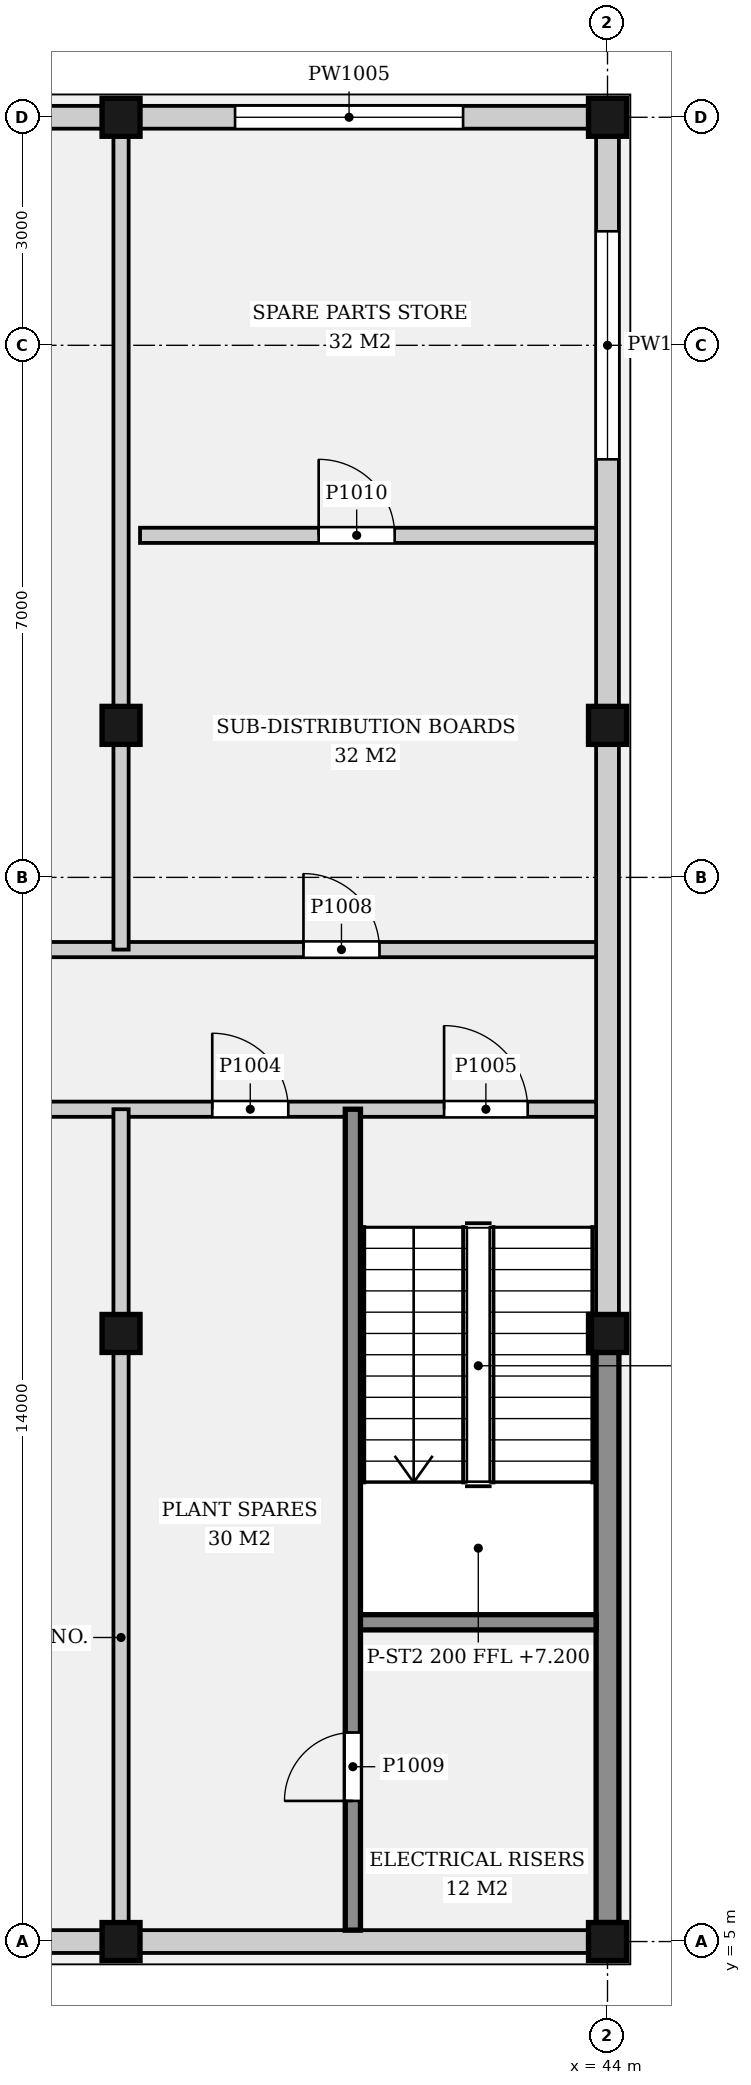
"""IFC4 building model, lengths in metres.
Left out: names, types, materials, properties, quantities, classifications, styles, units other than length and angle.
Written with IfcOpenShell. Run it as: python <this file> out.ifc"""

import sys

from ifc_helpers import new_model, si_unit, direction, frame, frame_2d, origin, origin_2d, place, context, subcontext, project, spatial, rectangle, extrude, element, fill, save


model = new_model("IFC4")
c1 = context("Model", 3, precision=1e-05, world=origin(), true_north=direction((0.0, 1.0)))
c2 = subcontext(c1, "Body", "Model", "MODEL_VIEW")
j1 = project(units=[si_unit("LENGTHUNIT", "METRE"), si_unit("PLANEANGLEUNIT", "RADIAN")], contexts=[c1])
p1 = place(None, origin())
s1 = spatial("IfcSite", under=j1, at=p1, CompositionType="ELEMENT")
p2 = place(p1, origin())
s2 = spatial("IfcBuilding", under=s1, at=p2, CompositionType="ELEMENT")
p3 = place(p2, frame((0.0, 0.0, 5.0)))
s3 = spatial("IfcBuildingStorey", under=s2, at=p3, CompositionType="ELEMENT", Elevation=5.0)
for number, where, z_axis, x_axis in (
    (1, (37.6, 5.0, 0.0), (0.0, 0.0, 1.0), (1.0, 0.0, 0.0)),
    (2, (37.6, 13.0, 0.0), (0.0, 0.0, 1.0), (1.0, 0.0, 0.0)),
    (3, (37.6, 21.0, 0.0), (0.0, 0.0, 1.0), (1.0, 0.0, 0.0)),
    (4, (37.6, 29.0, 0.0), (0.0, 0.0, 1.0), (1.0, 0.0, 0.0)),
    (5, (44.0, 5.0, 0.0), (0.0, 0.0, 1.0), (1.0, 0.0, 0.0)),
    (6, (44.0, 13.0, 0.0), (0.0, 0.0, 1.0), (1.0, 0.0, 0.0)),
    (7, (44.0, 21.0, 0.0), (0.0, 0.0, 1.0), (1.0, 0.0, 0.0)),
    (8, (44.0, 29.0, 0.0), (0.0, 0.0, 1.0), (1.0, 0.0, 0.0)),
):
    element("IfcColumn", number, at=place(p3, frame(where, z_axis=z_axis, x_axis=x_axis)), inside=s3, PredefinedType="COLUMN", context=c2, shape_type="SweptSolid", body=[
        extrude(rectangle(XDim=0.5, YDim=0.5, at=origin_2d()), origin(), (0.0, 0.0, 1.0), 4.4),
    ])
p4 = place(p3, frame((31.45, 5.0, 0.0), z_axis=(0.0, 0.0, 1.0), x_axis=(1.0, 0.0, 0.0)))
e9 = element("IfcWall", 9, at=p4, inside=s3, PredefinedType="SOLIDWALL", context=c2, shape_type="SweptSolid", body=[
    extrude(rectangle(XDim=5.9, YDim=0.3, at=frame_2d((2.95, 0.0))), origin(), (0.0, 0.0, 1.0), 3.98),
])
p5 = place(p4, frame((1.25, 0.0, 0.6)))
e10 = element("IfcOpeningElement", 10, at=p5, cuts=e9, PredefinedType="OPENING", context=c2, shape_type="SweptSolid", body=[
    extrude(rectangle(XDim=3.4, YDim=2.4, at=frame_2d((1.7, 1.2))), frame((0.0, 0.16, 0.0), z_axis=(0.0, -1.0, 0.0), x_axis=(1.0, 0.0, 0.0)), (0.0, 0.0, 1.0), 0.32),
])
p6 = place(p3, frame((37.85, 5.0, 0.0), z_axis=(0.0, 0.0, 1.0), x_axis=(1.0, 0.0, 0.0)))
e11 = element("IfcWall", 11, at=p6, inside=s3, PredefinedType="SOLIDWALL", context=c2, shape_type="SweptSolid", body=[
    extrude(rectangle(XDim=5.9, YDim=0.3, at=frame_2d((2.95, 0.0))), origin(), (0.0, 0.0, 1.0), 3.98),
])
p7 = place(p3, frame((31.45, 29.0, 0.0), z_axis=(0.0, 0.0, 1.0), x_axis=(1.0, 0.0, 0.0)))
e12 = element("IfcWall", 12, at=p7, inside=s3, PredefinedType="SOLIDWALL", context=c2, shape_type="SweptSolid", body=[
    extrude(rectangle(XDim=5.9, YDim=0.3, at=frame_2d((2.95, 0.0))), origin(), (0.0, 0.0, 1.0), 3.98),
])
p8 = place(p7, frame((1.25, 0.0, 0.6)))
e13 = element("IfcOpeningElement", 13, at=p8, cuts=e12, PredefinedType="OPENING", context=c2, shape_type="SweptSolid", body=[
    extrude(rectangle(XDim=3.4, YDim=2.4, at=frame_2d((1.7, 1.2))), frame((0.0, 0.16, 0.0), z_axis=(0.0, -1.0, 0.0), x_axis=(1.0, 0.0, 0.0)), (0.0, 0.0, 1.0), 0.32),
])
p9 = place(p3, frame((37.85, 29.0, 0.0), z_axis=(0.0, 0.0, 1.0), x_axis=(1.0, 0.0, 0.0)))
e14 = element("IfcWall", 14, at=p9, inside=s3, PredefinedType="SOLIDWALL", context=c2, shape_type="SweptSolid", body=[
    extrude(rectangle(XDim=5.9, YDim=0.3, at=frame_2d((2.95, 0.0))), origin(), (0.0, 0.0, 1.0), 3.98),
])
p10 = place(p9, frame((1.25, 0.0, 0.6)))
e15 = element("IfcOpeningElement", 15, at=p10, cuts=e14, PredefinedType="OPENING", context=c2, shape_type="SweptSolid", body=[
    extrude(rectangle(XDim=3.0, YDim=2.2, at=frame_2d((1.5, 1.1))), frame((0.0, 0.16, 0.0), z_axis=(0.0, -1.0, 0.0), x_axis=(1.0, 0.0, 0.0)), (0.0, 0.0, 1.0), 0.32),
])
for number, where, z_axis, x_axis in (
    (16, (44.0, 5.25, 0.0), (0.0, 0.0, 1.0), (0.0, 1.0, 0.0)),
    (17, (44.0, 13.25, 0.0), (0.0, 0.0, 1.0), (0.0, 1.0, 0.0)),
):
    element("IfcWall", number, at=place(p3, frame(where, z_axis=z_axis, x_axis=x_axis)), inside=s3, PredefinedType="SOLIDWALL", context=c2, shape_type="SweptSolid", body=[
        extrude(rectangle(XDim=7.5, YDim=0.3, at=frame_2d((3.75, 0.0))), origin(), (0.0, 0.0, 1.0), 3.98),
    ])
p11 = place(p3, frame((44.0, 21.25, 0.0), z_axis=(0.0, 0.0, 1.0), x_axis=(0.0, 1.0, 0.0)))
e18 = element("IfcWall", 18, at=p11, inside=s3, PredefinedType="SOLIDWALL", context=c2, shape_type="SweptSolid", body=[
    extrude(rectangle(XDim=7.5, YDim=0.3, at=frame_2d((3.75, 0.0))), origin(), (0.0, 0.0, 1.0), 3.98),
])
p12 = place(p11, frame((3.25, 0.0, 0.6)))
e19 = element("IfcOpeningElement", 19, at=p12, cuts=e18, PredefinedType="OPENING", context=c2, shape_type="SweptSolid", body=[
    extrude(rectangle(XDim=3.0, YDim=2.2, at=frame_2d((1.5, 1.1))), frame((0.0, 0.16, 0.0), z_axis=(0.0, -1.0, 0.0), x_axis=(1.0, 0.0, 0.0)), (0.0, 0.0, 1.0), 0.32),
])
p13 = place(p3, frame((12.15, 15.95, 0.0), z_axis=(0.0, 0.0, 1.0), x_axis=(1.0, 0.0, 0.0)))
e20 = element("IfcWall", 20, at=p13, inside=s3, PredefinedType="PARTITIONING", context=c2, shape_type="SweptSolid", body=[
    extrude(rectangle(XDim=31.7, YDim=0.2, at=frame_2d((15.85, 0.0))), origin(), (0.0, 0.0, 1.0), 3.98),
])
p14 = place(p13, frame((0.9, 0.0, 0.0)))
e21 = element("IfcOpeningElement", 21, at=p14, cuts=e20, PredefinedType="OPENING", context=c2, shape_type="SweptSolid", body=[
    extrude(rectangle(XDim=0.9, YDim=2.1, at=frame_2d((0.45, 1.05))), frame((0.0, 0.11, 0.0), z_axis=(0.0, -1.0, 0.0), x_axis=(1.0, 0.0, 0.0)), (0.0, 0.0, 1.0), 0.22),
])
p15 = place(p13, frame((6.85, 0.0, 0.0)))
e22 = element("IfcOpeningElement", 22, at=p15, cuts=e20, PredefinedType="OPENING", context=c2, shape_type="SweptSolid", body=[
    extrude(rectangle(XDim=1.0, YDim=2.1, at=frame_2d((0.5, 1.05))), frame((0.0, 0.11, 0.0), z_axis=(0.0, -1.0, 0.0), x_axis=(1.0, 0.0, 0.0)), (0.0, 0.0, 1.0), 0.22),
])
p16 = place(p13, frame((17.95, 0.0, 0.0)))
e23 = element("IfcOpeningElement", 23, at=p16, cuts=e20, PredefinedType="OPENING", context=c2, shape_type="SweptSolid", body=[
    extrude(rectangle(XDim=1.8, YDim=2.4, at=frame_2d((0.9, 1.2))), frame((0.0, 0.11, 0.0), z_axis=(0.0, -1.0, 0.0), x_axis=(1.0, 0.0, 0.0)), (0.0, 0.0, 1.0), 0.22),
])
p17 = place(p13, frame((26.65, 0.0, 0.0)))
e24 = element("IfcOpeningElement", 24, at=p17, cuts=e20, PredefinedType="OPENING", context=c2, shape_type="SweptSolid", body=[
    extrude(rectangle(XDim=1.0, YDim=2.1, at=frame_2d((0.5, 1.05))), frame((0.0, 0.11, 0.0), z_axis=(0.0, -1.0, 0.0), x_axis=(1.0, 0.0, 0.0)), (0.0, 0.0, 1.0), 0.22),
])
p18 = place(p13, frame((29.7, 0.0, 0.0)))
e25 = element("IfcOpeningElement", 25, at=p18, cuts=e20, PredefinedType="OPENING", context=c2, shape_type="SweptSolid", body=[
    extrude(rectangle(XDim=1.1, YDim=2.1, at=frame_2d((0.55, 1.05))), frame((0.0, 0.11, 0.0), z_axis=(0.0, -1.0, 0.0), x_axis=(1.0, 0.0, 0.0)), (0.0, 0.0, 1.0), 0.22),
])
p19 = place(p3, frame((12.15, 18.05, 0.0), z_axis=(0.0, 0.0, 1.0), x_axis=(1.0, 0.0, 0.0)))
e26 = element("IfcWall", 26, at=p19, inside=s3, PredefinedType="PARTITIONING", context=c2, shape_type="SweptSolid", body=[
    extrude(rectangle(XDim=31.7, YDim=0.2, at=frame_2d((15.85, 0.0))), origin(), (0.0, 0.0, 1.0), 3.98),
])
p20 = place(p19, frame((3.95, 0.0, 0.0)))
e27 = element("IfcOpeningElement", 27, at=p20, cuts=e26, PredefinedType="OPENING", context=c2, shape_type="SweptSolid", body=[
    extrude(rectangle(XDim=1.8, YDim=2.4, at=frame_2d((0.9, 1.2))), frame((0.0, 0.11, 0.0), z_axis=(0.0, -1.0, 0.0), x_axis=(1.0, 0.0, 0.0)), (0.0, 0.0, 1.0), 0.22),
])
p21 = place(p19, frame((17.95, 0.0, 0.0)))
e28 = element("IfcOpeningElement", 28, at=p21, cuts=e26, PredefinedType="OPENING", context=c2, shape_type="SweptSolid", body=[
    extrude(rectangle(XDim=1.8, YDim=2.4, at=frame_2d((0.9, 1.2))), frame((0.0, 0.11, 0.0), z_axis=(0.0, -1.0, 0.0), x_axis=(1.0, 0.0, 0.0)), (0.0, 0.0, 1.0), 0.22),
])
p22 = place(p19, frame((27.85, 0.0, 0.0)))
e29 = element("IfcOpeningElement", 29, at=p22, cuts=e26, PredefinedType="OPENING", context=c2, shape_type="SweptSolid", body=[
    extrude(rectangle(XDim=1.0, YDim=2.1, at=frame_2d((0.5, 1.05))), frame((0.0, 0.11, 0.0), z_axis=(0.0, -1.0, 0.0), x_axis=(1.0, 0.0, 0.0)), (0.0, 0.0, 1.0), 0.22),
])
p23 = place(p3, frame((37.85, 23.5, 0.0), z_axis=(0.0, 0.0, 1.0), x_axis=(1.0, 0.0, 0.0)))
e30 = element("IfcWall", 30, at=p23, inside=s3, PredefinedType="PARTITIONING", context=c2, shape_type="SweptSolid", body=[
    extrude(rectangle(XDim=6.0, YDim=0.2, at=frame_2d((3.0, 0.0))), origin(), (0.0, 0.0, 1.0), 3.98),
])
p24 = place(p23, frame((2.35, 0.0, 0.0)))
e31 = element("IfcOpeningElement", 31, at=p24, cuts=e30, PredefinedType="OPENING", context=c2, shape_type="SweptSolid", body=[
    extrude(rectangle(XDim=1.0, YDim=2.1, at=frame_2d((0.5, 1.05))), frame((0.0, 0.11, 0.0), z_axis=(0.0, -1.0, 0.0), x_axis=(1.0, 0.0, 0.0)), (0.0, 0.0, 1.0), 0.22),
])
p25 = place(p3, frame((37.6, 5.25, 0.0), z_axis=(0.0, 0.0, 1.0), x_axis=(0.0, 1.0, 0.0)))
e32 = element("IfcWall", 32, at=p25, inside=s3, PredefinedType="PARTITIONING", context=c2, shape_type="SweptSolid", body=[
    extrude(rectangle(XDim=7.5, YDim=0.2, at=frame_2d((3.75, 0.0))), origin(), (0.0, 0.0, 1.0), 3.98),
])
p26 = place(p3, frame((37.6, 13.25, 0.0), z_axis=(0.0, 0.0, 1.0), x_axis=(0.0, 1.0, 0.0)))
e33 = element("IfcWall", 33, at=p26, inside=s3, PredefinedType="PARTITIONING", context=c2, shape_type="SweptSolid", body=[
    extrude(rectangle(XDim=2.7, YDim=0.2, at=frame_2d((1.35, 0.0))), origin(), (0.0, 0.0, 1.0), 3.98),
])
p27 = place(p3, frame((40.65, 5.15, 0.0), z_axis=(0.0, 0.0, 1.0), x_axis=(0.0, 1.0, 0.0)))
e34 = element("IfcWall", 34, at=p27, inside=s3, PredefinedType="SOLIDWALL", context=c2, shape_type="SweptSolid", body=[
    extrude(rectangle(XDim=10.8, YDim=0.2, at=frame_2d((5.4, 0.0))), origin(), (0.0, 0.0, 1.0), 3.98),
])
p28 = place(p27, frame((1.7, 0.0, 0.0)))
e35 = element("IfcOpeningElement", 35, at=p28, cuts=e34, PredefinedType="OPENING", context=c2, shape_type="SweptSolid", body=[
    extrude(rectangle(XDim=0.9, YDim=2.1, at=frame_2d((0.45, 1.05))), frame((0.0, 0.11, 0.0), z_axis=(0.0, -1.0, 0.0), x_axis=(1.0, 0.0, 0.0)), (0.0, 0.0, 1.0), 0.22),
])
p29 = place(p3, frame((37.6, 18.05, 0.0), z_axis=(0.0, 0.0, 1.0), x_axis=(0.0, 1.0, 0.0)))
e36 = element("IfcWall", 36, at=p29, inside=s3, PredefinedType="PARTITIONING", context=c2, shape_type="SweptSolid", body=[
    extrude(rectangle(XDim=2.7, YDim=0.2, at=frame_2d((1.35, 0.0))), origin(), (0.0, 0.0, 1.0), 3.98),
])
p30 = place(p3, frame((37.6, 21.25, 0.0), z_axis=(0.0, 0.0, 1.0), x_axis=(0.0, 1.0, 0.0)))
e37 = element("IfcWall", 37, at=p30, inside=s3, PredefinedType="PARTITIONING", context=c2, shape_type="SweptSolid", body=[
    extrude(rectangle(XDim=7.5, YDim=0.2, at=frame_2d((3.75, 0.0))), origin(), (0.0, 0.0, 1.0), 3.98),
])
p31 = place(p3, frame((40.65, 9.2, 0.0), z_axis=(0.0, 0.0, 1.0), x_axis=(1.0, 0.0, 0.0)))
e38 = element("IfcWall", 38, at=p31, inside=s3, PredefinedType="SOLIDWALL", context=c2, shape_type="SweptSolid", body=[
    extrude(rectangle(XDim=3.2, YDim=0.2, at=frame_2d((1.6, 0.0))), origin(), (0.0, 0.0, 1.0), 3.98),
])
p32 = place(p10, origin())
e39 = element("IfcWindow", 39, at=p32, inside=s3, PartitioningType="SINGLE_PANEL", PredefinedType="USERDEFINED", context=c2, shape_type="SweptSolid", body=[
    extrude(rectangle(XDim=3.0, YDim=2.2, at=frame_2d((1.5, 1.1))), frame((0.0, 0.03, 0.0), z_axis=(0.0, -1.0, 0.0), x_axis=(1.0, 0.0, 0.0)), (0.0, 0.0, 1.0), 0.06),
])
fill(e15, e39)
p33 = place(p12, origin())
e40 = element("IfcWindow", 40, at=p33, inside=s3, PartitioningType="SINGLE_PANEL", PredefinedType="USERDEFINED", context=c2, shape_type="SweptSolid", body=[
    extrude(rectangle(XDim=3.0, YDim=2.2, at=frame_2d((1.5, 1.1))), frame((0.0, 0.03, 0.0), z_axis=(0.0, -1.0, 0.0), x_axis=(1.0, 0.0, 0.0)), (0.0, 0.0, 1.0), 0.06),
])
fill(e19, e40)
p34 = place(p17, origin())
e41 = element("IfcDoor", 41, at=p34, inside=s3, OperationType="SINGLE_SWING_LEFT", PredefinedType="DOOR", context=c2, shape_type="SweptSolid", body=[
    extrude(rectangle(XDim=1.0, YDim=2.1, at=frame_2d((0.5, 1.05))), frame((0.0, 0.025, 0.0), z_axis=(0.0, -1.0, 0.0), x_axis=(1.0, 0.0, 0.0)), (0.0, 0.0, 1.0), 0.05),
])
fill(e24, e41)
p35 = place(p18, origin())
e42 = element("IfcDoor", 42, at=p35, inside=s3, OperationType="SINGLE_SWING_LEFT", PredefinedType="DOOR", context=c2, shape_type="SweptSolid", body=[
    extrude(rectangle(XDim=1.1, YDim=2.1, at=frame_2d((0.55, 1.05))), frame((0.0, 0.025, 0.0), z_axis=(0.0, -1.0, 0.0), x_axis=(1.0, 0.0, 0.0)), (0.0, 0.0, 1.0), 0.05),
])
fill(e25, e42)
p36 = place(p22, origin())
e43 = element("IfcDoor", 43, at=p36, inside=s3, OperationType="SINGLE_SWING_LEFT", PredefinedType="DOOR", context=c2, shape_type="SweptSolid", body=[
    extrude(rectangle(XDim=1.0, YDim=2.1, at=frame_2d((0.5, 1.05))), frame((0.0, 0.025, 0.0), z_axis=(0.0, -1.0, 0.0), x_axis=(1.0, 0.0, 0.0)), (0.0, 0.0, 1.0), 0.05),
])
fill(e29, e43)
p37 = place(p28, origin())
e44 = element("IfcDoor", 44, at=p37, inside=s3, OperationType="SINGLE_SWING_LEFT", PredefinedType="DOOR", context=c2, shape_type="SweptSolid", body=[
    extrude(rectangle(XDim=0.9, YDim=2.1, at=frame_2d((0.45, 1.05))), frame((0.0, 0.025, 0.0), z_axis=(0.0, -1.0, 0.0), x_axis=(1.0, 0.0, 0.0)), (0.0, 0.0, 1.0), 0.05),
])
fill(e35, e44)
p38 = place(p24, origin())
e45 = element("IfcDoor", 45, at=p38, inside=s3, OperationType="SINGLE_SWING_LEFT", PredefinedType="DOOR", context=c2, shape_type="SweptSolid", body=[
    extrude(rectangle(XDim=1.0, YDim=2.1, at=frame_2d((0.5, 1.05))), frame((0.0, 0.025, 0.0), z_axis=(0.0, -1.0, 0.0), x_axis=(1.0, 0.0, 0.0)), (0.0, 0.0, 1.0), 0.05),
])
fill(e31, e45)
save(model, sys.argv[1])
